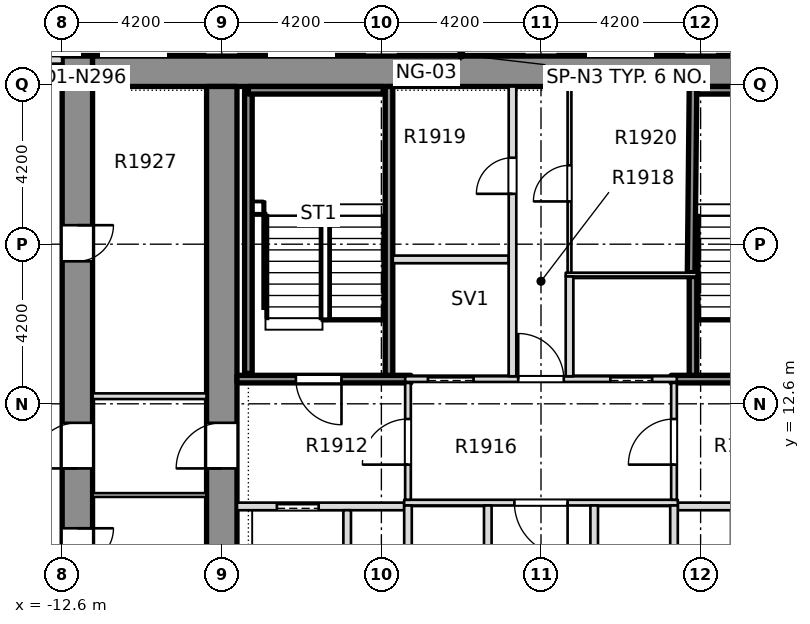
"""IFC4 building model, lengths in metres.
Left out: names, types, materials, properties, quantities, classifications, styles, units other than length and angle.
Written with IfcOpenShell. Run it as: python <this file> out.ifc"""

import sys

from ifc_helpers import new_model, si_unit, direction, frame, frame_2d, origin, place, context, subcontext, project, spatial, rectangle, extrude, element, fill, save


model = new_model("IFC4")
c1 = context("Model", 3, precision=1e-05, world=origin(), true_north=direction((0.0, 1.0)))
c2 = subcontext(c1, "Body", "Model", "MODEL_VIEW")
j1 = project(units=[si_unit("LENGTHUNIT", "METRE"), si_unit("PLANEANGLEUNIT", "RADIAN")], contexts=[c1])
p1 = place(None, origin())
s1 = spatial("IfcSite", under=j1, at=p1, CompositionType="ELEMENT")
p2 = place(p1, origin())
s2 = spatial("IfcBuilding", under=s1, at=p2, CompositionType="ELEMENT")
p3 = place(p2, frame((0.0, 0.0, 75.9)))
s3 = spatial("IfcBuildingStorey", under=s2, at=p3, CompositionType="ELEMENT", Elevation=75.9)
p4 = place(p3, frame((-12.15, -8.4, -0.5), z_axis=(0.0, 0.0, 1.0), x_axis=(0.0, 1.0, 0.0)))
e1 = element("IfcWall", 1, at=p4, inside=s3, PredefinedType="SHEAR", context=c2, shape_type="SweptSolid", body=[
    extrude(rectangle(XDim=30.15, YDim=0.9, at=frame_2d((15.075, 0.0))), origin(), (0.0, 0.0, 1.0), 4.68),
])
p5 = place(p4, frame((3.925, 0.0, 0.5)))
e2 = element("IfcOpeningElement", 2, at=p5, cuts=e1, PredefinedType="OPENING", context=c2, shape_type="SweptSolid", body=[
    extrude(rectangle(XDim=0.95, YDim=2.1, at=frame_2d((0.475, 1.05))), frame((0.0, 0.46, 0.0), z_axis=(0.0, -1.0, 0.0), x_axis=(1.0, 0.0, 0.0)), (0.0, 0.0, 1.0), 0.92),
])
p6 = place(p4, frame((9.175, 0.0, 0.5)))
e3 = element("IfcOpeningElement", 3, at=p6, cuts=e1, PredefinedType="OPENING", context=c2, shape_type="SweptSolid", body=[
    extrude(rectangle(XDim=0.95, YDim=2.1, at=frame_2d((0.475, 1.05))), frame((0.0, 0.46, 0.0), z_axis=(0.0, -1.0, 0.0), x_axis=(1.0, 0.0, 0.0)), (0.0, 0.0, 1.0), 0.92),
])
p7 = place(p4, frame((14.525, 0.0, 0.5)))
e4 = element("IfcOpeningElement", 4, at=p7, cuts=e1, PredefinedType="OPENING", context=c2, shape_type="SweptSolid", body=[
    extrude(rectangle(XDim=0.95, YDim=2.1, at=frame_2d((0.475, 1.05))), frame((0.0, 0.46, 0.0), z_axis=(0.0, -1.0, 0.0), x_axis=(1.0, 0.0, 0.0)), (0.0, 0.0, 1.0), 0.92),
])
p8 = place(p4, frame((22.225, 0.0, 0.5)))
e5 = element("IfcOpeningElement", 5, at=p8, cuts=e1, PredefinedType="OPENING", context=c2, shape_type="SweptSolid", body=[
    extrude(rectangle(XDim=0.95, YDim=2.1, at=frame_2d((0.475, 1.05))), frame((0.0, 0.46, 0.0), z_axis=(0.0, -1.0, 0.0), x_axis=(1.0, 0.0, 0.0)), (0.0, 0.0, 1.0), 0.92),
])
p9 = place(p4, frame((26.25, 0.0, 0.5)))
e6 = element("IfcOpeningElement", 6, at=p9, cuts=e1, PredefinedType="OPENING", context=c2, shape_type="SweptSolid", body=[
    extrude(rectangle(XDim=0.95, YDim=2.1, at=frame_2d((0.475, 1.05))), frame((0.0, 0.46, 0.0), z_axis=(0.0, -1.0, 0.0), x_axis=(1.0, 0.0, 0.0)), (0.0, 0.0, 1.0), 0.92),
])
p10 = place(p4, frame((19.3, 0.0, 0.5)))
e7 = element("IfcOpeningElement", 7, at=p10, cuts=e1, PredefinedType="OPENING", context=c2, shape_type="SweptSolid", body=[
    extrude(rectangle(XDim=1.2, YDim=2.1, at=frame_2d((0.6, 1.05))), frame((0.0, 0.46, 0.0), z_axis=(0.0, -1.0, 0.0), x_axis=(1.0, 0.0, 0.0)), (0.0, 0.0, 1.0), 0.92),
])
p11 = place(p3, frame((-11.7, 21.3, -0.5), z_axis=(0.0, 0.0, 1.0), x_axis=(1.0, 0.0, 0.0)))
e8 = element("IfcWall", 8, at=p11, inside=s3, PredefinedType="SOLIDWALL", context=c2, shape_type="SweptSolid", body=[
    extrude(rectangle(XDim=23.4, YDim=0.9, at=frame_2d((11.7, 0.0))), origin(), (0.0, 0.0, 1.0), 4.68),
])
p12 = place(p3, frame((-8.4, -7.5, -0.5), z_axis=(0.0, 0.0, 1.0), x_axis=(0.0, 1.0, 0.0)))
e9 = element("IfcWall", 9, at=p12, inside=s3, PredefinedType="SHEAR", context=c2, shape_type="SweptSolid", body=[
    extrude(rectangle(XDim=28.35, YDim=0.9, at=frame_2d((14.175, 0.0))), origin(), (0.0, 0.0, 1.0), 4.68),
])
p13 = place(p12, frame((18.4, 0.0, 0.5)))
e10 = element("IfcOpeningElement", 10, at=p13, cuts=e9, PredefinedType="OPENING", context=c2, shape_type="SweptSolid", body=[
    extrude(rectangle(XDim=1.2, YDim=2.1, at=frame_2d((0.6, 1.05))), frame((0.0, 0.46, 0.0), z_axis=(0.0, -1.0, 0.0), x_axis=(1.0, 0.0, 0.0)), (0.0, 0.0, 1.0), 0.92),
])
p14 = place(p3, frame((-12.6, 21.65, 0.0), z_axis=(0.0, 0.0, 1.0), x_axis=(-1.0, 0.0, 0.0)))
e11 = element("IfcWall", 11, at=p14, inside=s3, PredefinedType="STANDARD", context=c2, shape_type="SweptSolid", body=[
    extrude(rectangle(XDim=3.5, YDim=0.2, at=frame_2d((1.75, 0.0))), origin(), (0.0, 0.0, 1.0), 4.18),
])
p15 = place(p3, frame((-7.949, 9.9, 0.0), z_axis=(0.0, 0.0, 1.0), x_axis=(1.0, 0.0, 0.0)))
e12 = element("IfcWall", 12, at=p15, inside=s3, PredefinedType="PARTITIONING", context=c2, shape_type="SweptSolid", body=[
    extrude(rectangle(XDim=4.349, YDim=0.2, at=frame_2d((2.174, 0.0))), origin(), (0.0, 0.0, 1.0), 4.18),
])
p16 = place(p15, frame((0.999, 0.0, 0.0)))
e13 = element("IfcOpeningElement", 13, at=p16, cuts=e12, PredefinedType="OPENING", context=c2, shape_type="SweptSolid", body=[
    extrude(rectangle(XDim=1.1, YDim=2.1, at=frame_2d((0.55, 1.05))), frame((0.0, 0.11, 0.0), z_axis=(0.0, -1.0, 0.0), x_axis=(1.0, 0.0, 0.0)), (0.0, 0.0, 1.0), 0.22),
])
p17 = place(p3, frame((3.6, 9.9, 0.0), z_axis=(0.0, 0.0, 1.0), x_axis=(1.0, 0.0, 0.0)))
e14 = element("IfcWall", 14, at=p17, inside=s3, PredefinedType="PARTITIONING", context=c2, shape_type="SweptSolid", body=[
    extrude(rectangle(XDim=4.349, YDim=0.2, at=frame_2d((2.174, 0.0))), origin(), (0.0, 0.0, 1.0), 4.18),
])
p18 = place(p17, frame((2.25, 0.0, 0.0)))
e15 = element("IfcOpeningElement", 15, at=p18, cuts=e14, PredefinedType="OPENING", context=c2, shape_type="SweptSolid", body=[
    extrude(rectangle(XDim=1.1, YDim=2.1, at=frame_2d((0.55, 1.05))), frame((0.0, 0.11, 0.0), z_axis=(0.0, -1.0, 0.0), x_axis=(1.0, 0.0, 0.0)), (0.0, 0.0, 1.0), 0.22),
])
p19 = place(p3, frame((-3.6, 10.0, 0.0), z_axis=(0.0, 0.0, 1.0), x_axis=(1.0, 0.0, 0.0)))
e16 = element("IfcWall", 16, at=p19, inside=s3, PredefinedType="PARTITIONING", context=c2, shape_type="SweptSolid", body=[
    extrude(rectangle(XDim=7.2, YDim=0.15, at=frame_2d((3.6, 0.0))), origin(), (0.0, 0.0, 1.0), 4.18),
])
p20 = place(p19, frame((2.9, 0.0, 0.0)))
e17 = element("IfcOpeningElement", 17, at=p20, cuts=e16, PredefinedType="OPENING", context=c2, shape_type="SweptSolid", body=[
    extrude(rectangle(XDim=1.4, YDim=2.1, at=frame_2d((0.7, 1.05))), frame((0.0, 0.085, 0.0), z_axis=(0.0, -1.0, 0.0), x_axis=(1.0, 0.0, 0.0)), (0.0, 0.0, 1.0), 0.17),
])
p21 = place(p3, frame((-7.949, 13.25, 0.0), z_axis=(0.0, 0.0, 1.0), x_axis=(1.0, 0.0, 0.0)))
e18 = element("IfcWall", 18, at=p21, inside=s3, PredefinedType="SOLIDWALL", context=c2, shape_type="SweptSolid", body=[
    extrude(rectangle(XDim=4.524, YDim=0.2, at=frame_2d((2.262, 0.0))), origin(), (0.0, 0.0, 1.0), 4.18),
])
p22 = place(p21, frame((1.499, 0.0, 0.0)))
e19 = element("IfcOpeningElement", 19, at=p22, cuts=e18, PredefinedType="OPENING", context=c2, shape_type="SweptSolid", body=[
    extrude(rectangle(XDim=1.2, YDim=2.1, at=frame_2d((0.6, 1.05))), frame((0.0, 0.11, 0.0), z_axis=(0.0, -1.0, 0.0), x_axis=(1.0, 0.0, 0.0)), (0.0, 0.0, 1.0), 0.22),
])
p23 = place(p3, frame((-3.575, 13.25, 0.0), z_axis=(0.0, 0.0, 1.0), x_axis=(1.0, 0.0, 0.0)))
e20 = element("IfcWall", 20, at=p23, inside=s3, PredefinedType="PARTITIONING", context=c2, shape_type="SweptSolid", body=[
    extrude(rectangle(XDim=7.15, YDim=0.15, at=frame_2d((3.575, 0.0))), origin(), (0.0, 0.0, 1.0), 4.18),
])
p24 = place(p23, frame((0.6, 0.0, 0.0)))
e21 = element("IfcOpeningElement", 21, at=p24, cuts=e20, PredefinedType="OPENING", context=c2, shape_type="SweptSolid", body=[
    extrude(rectangle(XDim=1.2, YDim=2.1, at=frame_2d((0.6, 1.05))), frame((0.0, 0.085, 0.0), z_axis=(0.0, -1.0, 0.0), x_axis=(1.0, 0.0, 0.0)), (0.0, 0.0, 1.0), 0.17),
])
p25 = place(p23, frame((5.4, 0.0, 0.0)))
e22 = element("IfcOpeningElement", 22, at=p25, cuts=e20, PredefinedType="OPENING", context=c2, shape_type="SweptSolid", body=[
    extrude(rectangle(XDim=1.1, YDim=2.1, at=frame_2d((0.55, 1.05))), frame((0.0, 0.085, 0.0), z_axis=(0.0, -1.0, 0.0), x_axis=(1.0, 0.0, 0.0)), (0.0, 0.0, 1.0), 0.17),
])
p26 = place(p23, frame((2.975, 0.0, 0.0)))
e23 = element("IfcOpeningElement", 23, at=p26, cuts=e20, PredefinedType="OPENING", context=c2, shape_type="SweptSolid", body=[
    extrude(rectangle(XDim=1.2, YDim=2.1, at=frame_2d((0.6, 1.05))), frame((0.0, 0.085, 0.0), z_axis=(0.0, -1.0, 0.0), x_axis=(1.0, 0.0, 0.0)), (0.0, 0.0, 1.0), 0.17),
])
p27 = place(p3, frame((3.425, 13.25, 0.0), z_axis=(0.0, 0.0, 1.0), x_axis=(1.0, 0.0, 0.0)))
e24 = element("IfcWall", 24, at=p27, inside=s3, PredefinedType="SOLIDWALL", context=c2, shape_type="SweptSolid", body=[
    extrude(rectangle(XDim=4.524, YDim=0.2, at=frame_2d((2.262, 0.0))), origin(), (0.0, 0.0, 1.0), 4.18),
])
p28 = place(p27, frame((1.825, 0.0, 0.0)))
e25 = element("IfcOpeningElement", 25, at=p28, cuts=e24, PredefinedType="OPENING", context=c2, shape_type="SweptSolid", body=[
    extrude(rectangle(XDim=1.2, YDim=2.1, at=frame_2d((0.6, 1.05))), frame((0.0, 0.11, 0.0), z_axis=(0.0, -1.0, 0.0), x_axis=(1.0, 0.0, 0.0)), (0.0, 0.0, 1.0), 0.22),
])
p29 = place(p3, frame((0.65, 16.0, 0.0), z_axis=(0.0, 0.0, 1.0), x_axis=(1.0, 0.0, 0.0)))
e26 = element("IfcWall", 26, at=p29, inside=s3, PredefinedType="PARTITIONING", context=c2, shape_type="SweptSolid", body=[
    extrude(rectangle(XDim=3.45, YDim=0.1, at=frame_2d((1.725, 0.0))), origin(), (0.0, 0.0, 1.0), 4.18),
])
p30 = place(p3, frame((-3.9, 16.4, 0.0), z_axis=(0.0, 0.0, 1.0), x_axis=(1.0, 0.0, 0.0)))
e27 = element("IfcWall", 27, at=p30, inside=s3, PredefinedType="PARTITIONING", context=c2, shape_type="SweptSolid", body=[
    extrude(rectangle(XDim=3.05, YDim=0.2, at=frame_2d((1.525, 0.0))), origin(), (0.0, 0.0, 1.0), 4.18),
])
p31 = place(p3, frame((-5.1, 7.075, 0.0), z_axis=(0.0, 0.0, 1.0), x_axis=(0.0, 1.0, 0.0)))
e28 = element("IfcWall", 28, at=p31, inside=s3, PredefinedType="PARTITIONING", context=c2, shape_type="SweptSolid", body=[
    extrude(rectangle(XDim=2.725, YDim=0.2, at=frame_2d((1.363, 0.0))), origin(), (0.0, 0.0, 1.0), 4.18),
])
p32 = place(p3, frame((-4.0, 13.35, 0.0), z_axis=(0.0, 0.0, 1.0), x_axis=(0.0, 1.0, 0.0)))
e29 = element("IfcWall", 29, at=p32, inside=s3, PredefinedType="SOLIDWALL", context=c2, shape_type="SweptSolid", body=[
    extrude(rectangle(XDim=7.499, YDim=0.2, at=frame_2d((3.75, 0.0))), origin(), (0.0, 0.0, 1.0), 4.18),
])
p33 = place(p3, frame((-3.5, 7.075, 0.0), z_axis=(0.0, 0.0, 1.0), x_axis=(0.0, 1.0, 0.0)))
e30 = element("IfcWall", 30, at=p33, inside=s3, PredefinedType="PARTITIONING", context=c2, shape_type="SweptSolid", body=[
    extrude(rectangle(XDim=2.85, YDim=0.2, at=frame_2d((1.425, 0.0))), origin(), (0.0, 0.0, 1.0), 4.18),
])
p34 = place(p3, frame((-3.5, 10.075, 0.0), z_axis=(0.0, 0.0, 1.0), x_axis=(0.0, 1.0, 0.0)))
e31 = element("IfcWall", 31, at=p34, inside=s3, PredefinedType="PARTITIONING", context=c2, shape_type="SweptSolid", body=[
    extrude(rectangle(XDim=3.075, YDim=0.15, at=frame_2d((1.538, 0.0))), origin(), (0.0, 0.0, 1.0), 4.18),
])
p35 = place(p34, frame((0.925, 0.0, 0.0)))
e32 = element("IfcOpeningElement", 32, at=p35, cuts=e31, PredefinedType="OPENING", context=c2, shape_type="SweptSolid", body=[
    extrude(rectangle(XDim=1.2, YDim=2.1, at=frame_2d((0.6, 1.05))), frame((0.0, 0.085, 0.0), z_axis=(0.0, -1.0, 0.0), x_axis=(1.0, 0.0, 0.0)), (0.0, 0.0, 1.0), 0.17),
])
p36 = place(p3, frame((-1.4, 7.075, 0.0), z_axis=(0.0, 0.0, 1.0), x_axis=(0.0, 1.0, 0.0)))
e33 = element("IfcWall", 33, at=p36, inside=s3, PredefinedType="PARTITIONING", context=c2, shape_type="SweptSolid", body=[
    extrude(rectangle(XDim=2.85, YDim=0.2, at=frame_2d((1.425, 0.0))), origin(), (0.0, 0.0, 1.0), 4.18),
])
p37 = place(p3, frame((-0.75, 13.325, 0.0), z_axis=(0.0, 0.0, 1.0), x_axis=(0.0, 1.0, 0.0)))
e34 = element("IfcWall", 34, at=p37, inside=s3, PredefinedType="PARTITIONING", context=c2, shape_type="SweptSolid", body=[
    extrude(rectangle(XDim=7.524, YDim=0.2, at=frame_2d((3.762, 0.0))), origin(), (0.0, 0.0, 1.0), 4.18),
])
p38 = place(p37, frame((4.8, 0.0, 0.0)))
e35 = element("IfcOpeningElement", 35, at=p38, cuts=e34, PredefinedType="OPENING", context=c2, shape_type="SweptSolid", body=[
    extrude(rectangle(XDim=0.95, YDim=2.1, at=frame_2d((0.475, 1.05))), frame((0.0, 0.11, 0.0), z_axis=(0.0, -1.0, 0.0), x_axis=(1.0, 0.0, 0.0)), (0.0, 0.0, 1.0), 0.22),
])
p39 = place(p3, frame((0.75, 13.325, 0.0), z_axis=(0.0, 0.0, 1.0), x_axis=(0.0, 1.0, 0.0)))
e36 = element("IfcWall", 36, at=p39, inside=s3, PredefinedType="PARTITIONING", context=c2, shape_type="SweptSolid", body=[
    extrude(rectangle(XDim=2.625, YDim=0.2, at=frame_2d((1.312, 0.0))), origin(), (0.0, 0.0, 1.0), 4.18),
])
p40 = place(p3, frame((0.75, 16.05, 0.0), z_axis=(0.0, 0.0, 1.0), x_axis=(0.0, 1.0, 0.0)))
e37 = element("IfcWall", 37, at=p40, inside=s3, PredefinedType="PARTITIONING", context=c2, shape_type="SweptSolid", body=[
    extrude(rectangle(XDim=4.799, YDim=0.1, at=frame_2d((2.399, 0.0))), origin(), (0.0, 0.0, 1.0), 4.18),
])
p41 = place(p40, frame((1.875, 0.0, 0.0)))
e38 = element("IfcOpeningElement", 38, at=p41, cuts=e37, PredefinedType="OPENING", context=c2, shape_type="SweptSolid", body=[
    extrude(rectangle(XDim=0.95, YDim=2.1, at=frame_2d((0.475, 1.05))), frame((0.0, 0.06, 0.0), z_axis=(0.0, -1.0, 0.0), x_axis=(1.0, 0.0, 0.0)), (0.0, 0.0, 1.0), 0.12),
])
for number, where, z_axis, x_axis in (
    (39, (1.4, 7.075, 0.0), (0.0, 0.0, 1.0), (0.0, 1.0, 0.0)),
    (40, (3.5, 7.075, 0.0), (0.0, 0.0, 1.0), (0.0, 1.0, 0.0)),
):
    element("IfcWall", number, at=place(p3, frame(where, z_axis=z_axis, x_axis=x_axis)), inside=s3, PredefinedType="PARTITIONING", context=c2, shape_type="SweptSolid", body=[
        extrude(rectangle(XDim=2.85, YDim=0.2, at=frame_2d((1.425, 0.0))), origin(), (0.0, 0.0, 1.0), 4.18),
    ])
p42 = place(p3, frame((3.5, 10.075, 0.0), z_axis=(0.0, 0.0, 1.0), x_axis=(0.0, 1.0, 0.0)))
e41 = element("IfcWall", 41, at=p42, inside=s3, PredefinedType="PARTITIONING", context=c2, shape_type="SweptSolid", body=[
    extrude(rectangle(XDim=3.075, YDim=0.15, at=frame_2d((1.538, 0.0))), origin(), (0.0, 0.0, 1.0), 4.18),
])
p43 = place(p42, frame((0.925, 0.0, 0.0)))
e42 = element("IfcOpeningElement", 42, at=p43, cuts=e41, PredefinedType="OPENING", context=c2, shape_type="SweptSolid", body=[
    extrude(rectangle(XDim=1.2, YDim=2.1, at=frame_2d((0.6, 1.05))), frame((0.0, 0.085, 0.0), z_axis=(0.0, -1.0, 0.0), x_axis=(1.0, 0.0, 0.0)), (0.0, 0.0, 1.0), 0.17),
])
p44 = place(p3, frame((4.0, 13.35, 0.0), z_axis=(0.0, 0.0, 1.0), x_axis=(0.0, 1.0, 0.0)))
e43 = element("IfcWall", 43, at=p44, inside=s3, PredefinedType="SOLIDWALL", context=c2, shape_type="SweptSolid", body=[
    extrude(rectangle(XDim=2.6, YDim=0.2, at=frame_2d((1.3, 0.0))), origin(), (0.0, 0.0, 1.0), 4.18),
])
p45 = place(p3, frame((3.95, 16.05, 0.0), z_axis=(0.0, 0.0, 1.0), x_axis=(0.010538176883, 0.999944471872, 0.0)))
e44 = element("IfcWall", 44, at=p45, inside=s3, PredefinedType="SOLIDWALL", context=c2, shape_type="SweptSolid", body=[
    extrude(rectangle(XDim=4.749, YDim=0.2, at=frame_2d((2.375, 0.0))), origin(), (0.0, 0.0, 1.0), 4.18),
])
p46 = place(p3, frame((-11.699, 10.2, 0.0), z_axis=(0.0, 0.0, 1.0), x_axis=(1.0, 0.0, 0.0)))
e45 = element("IfcWall", 45, at=p46, inside=s3, PredefinedType="PARTITIONING", context=c2, shape_type="SweptSolid", body=[
    extrude(rectangle(XDim=2.848, YDim=0.15, at=frame_2d((1.424, 0.0))), origin(), (0.0, 0.0, 1.0), 4.18),
])
for number, where, z_axis, x_axis in (
    (46, (-11.699, 12.8, 0.0), (0.0, 0.0, 1.0), (1.0, 0.0, 0.0)),
    (47, (-11.699, 15.8, 0.0), (0.0, 0.0, 1.0), (1.0, 0.0, 0.0)),
):
    element("IfcWall", number, at=place(p3, frame(where, z_axis=z_axis, x_axis=x_axis)), inside=s3, PredefinedType="PARTITIONING", context=c2, shape_type="SweptSolid", body=[
        extrude(rectangle(XDim=2.848, YDim=0.1, at=frame_2d((1.424, 0.0))), origin(), (0.0, 0.0, 1.0), 4.18),
    ])
p47 = place(p3, frame((-7.7, 13.4, 0.0), z_axis=(0.0, 0.0, 1.0), x_axis=(0.0, 1.0, 0.0)))
e48 = element("IfcWall", 48, at=p47, inside=s3, PredefinedType="SOLIDWALL", context=c2, shape_type="SweptSolid", body=[
    extrude(rectangle(XDim=7.4, YDim=0.2, at=frame_2d((3.7, 0.0))), origin(), (0.0, 0.0, 1.0), 4.18),
])
p48 = place(p22, origin())
e49 = element("IfcDoor", 49, at=p48, inside=s3, OperationType="SINGLE_SWING_LEFT", PredefinedType="DOOR", context=c2, shape_type="SweptSolid", body=[
    extrude(rectangle(XDim=1.2, YDim=2.1, at=frame_2d((0.6, 1.05))), frame((0.0, 0.025, 0.0), z_axis=(0.0, -1.0, 0.0), x_axis=(1.0, 0.0, 0.0)), (0.0, 0.0, 1.0), 0.05),
])
fill(e19, e49)
p49 = place(p16, origin())
e50 = element("IfcDoor", 50, at=p49, inside=s3, OperationType="SLIDING_TO_RIGHT", PredefinedType="DOOR", context=c2, shape_type="SweptSolid", body=[
    extrude(rectangle(XDim=1.1, YDim=2.1, at=frame_2d((0.55, 1.05))), frame((0.0, 0.025, 0.0), z_axis=(0.0, -1.0, 0.0), x_axis=(1.0, 0.0, 0.0)), (0.0, 0.0, 1.0), 0.05),
])
fill(e13, e50)
p50 = place(p20, origin())
e51 = element("IfcDoor", 51, at=p50, inside=s3, OperationType="SINGLE_SWING_RIGHT", PredefinedType="DOOR", context=c2, shape_type="SweptSolid", body=[
    extrude(rectangle(XDim=1.4, YDim=2.1, at=frame_2d((0.7, 1.05))), frame((0.0, 0.025, 0.0), z_axis=(0.0, -1.0, 0.0), x_axis=(1.0, 0.0, 0.0)), (0.0, 0.0, 1.0), 0.05),
])
fill(e17, e51)
p51 = place(p24, origin())
e52 = element("IfcDoor", 52, at=p51, inside=s3, OperationType="SLIDING_TO_RIGHT", PredefinedType="DOOR", context=c2, shape_type="SweptSolid", body=[
    extrude(rectangle(XDim=1.2, YDim=2.1, at=frame_2d((0.6, 1.05))), frame((0.0, 0.025, 0.0), z_axis=(0.0, -1.0, 0.0), x_axis=(1.0, 0.0, 0.0)), (0.0, 0.0, 1.0), 0.05),
])
fill(e21, e52)
p52 = place(p25, origin())
e53 = element("IfcDoor", 53, at=p52, inside=s3, OperationType="SLIDING_TO_LEFT", PredefinedType="DOOR", context=c2, shape_type="SweptSolid", body=[
    extrude(rectangle(XDim=1.1, YDim=2.1, at=frame_2d((0.55, 1.05))), frame((0.0, 0.025, 0.0), z_axis=(0.0, -1.0, 0.0), x_axis=(1.0, 0.0, 0.0)), (0.0, 0.0, 1.0), 0.05),
])
fill(e22, e53)
p53 = place(p26, origin())
e54 = element("IfcDoor", 54, at=p53, inside=s3, OperationType="SINGLE_SWING_RIGHT", PredefinedType="DOOR", context=c2, shape_type="SweptSolid", body=[
    extrude(rectangle(XDim=1.2, YDim=2.1, at=frame_2d((0.6, 1.05))), frame((0.0, 0.025, 0.0), z_axis=(0.0, -1.0, 0.0), x_axis=(1.0, 0.0, 0.0)), (0.0, 0.0, 1.0), 0.05),
])
fill(e23, e54)
p54 = place(p38, origin())
e55 = element("IfcDoor", 55, at=p54, inside=s3, OperationType="SINGLE_SWING_RIGHT", PredefinedType="DOOR", context=c2, shape_type="SweptSolid", body=[
    extrude(rectangle(XDim=0.95, YDim=2.1, at=frame_2d((0.475, 1.05))), frame((0.0, 0.025, 0.0), z_axis=(0.0, -1.0, 0.0), x_axis=(1.0, 0.0, 0.0)), (0.0, 0.0, 1.0), 0.05),
])
fill(e35, e55)
p55 = place(p41, origin())
e56 = element("IfcDoor", 56, at=p55, inside=s3, OperationType="SINGLE_SWING_LEFT", PredefinedType="DOOR", context=c2, shape_type="SweptSolid", body=[
    extrude(rectangle(XDim=0.95, YDim=2.1, at=frame_2d((0.475, 1.05))), frame((0.0, 0.025, 0.0), z_axis=(0.0, -1.0, 0.0), x_axis=(1.0, 0.0, 0.0)), (0.0, 0.0, 1.0), 0.05),
])
fill(e38, e56)
p56 = place(p35, origin())
e57 = element("IfcDoor", 57, at=p56, inside=s3, OperationType="SINGLE_SWING_RIGHT", PredefinedType="DOOR", context=c2, shape_type="SweptSolid", body=[
    extrude(rectangle(XDim=1.2, YDim=2.1, at=frame_2d((0.6, 1.05))), frame((0.0, 0.025, 0.0), z_axis=(0.0, -1.0, 0.0), x_axis=(1.0, 0.0, 0.0)), (0.0, 0.0, 1.0), 0.05),
])
fill(e32, e57)
p57 = place(p43, origin())
e58 = element("IfcDoor", 58, at=p57, inside=s3, OperationType="SINGLE_SWING_LEFT", PredefinedType="DOOR", context=c2, shape_type="SweptSolid", body=[
    extrude(rectangle(XDim=1.2, YDim=2.1, at=frame_2d((0.6, 1.05))), frame((0.0, 0.025, 0.0), z_axis=(0.0, -1.0, 0.0), x_axis=(1.0, 0.0, 0.0)), (0.0, 0.0, 1.0), 0.05),
])
fill(e42, e58)
p58 = place(p8, origin())
e59 = element("IfcDoor", 59, at=p58, inside=s3, OperationType="SINGLE_SWING_LEFT", PredefinedType="DOOR", context=c2, shape_type="SweptSolid", body=[
    extrude(rectangle(XDim=0.95, YDim=2.1, at=frame_2d((0.475, 1.05))), frame((0.0, 0.025, 0.0), z_axis=(0.0, -1.0, 0.0), x_axis=(1.0, 0.0, 0.0)), (0.0, 0.0, 1.0), 0.05),
])
fill(e5, e59)
p59 = place(p9, origin())
e60 = element("IfcDoor", 60, at=p59, inside=s3, OperationType="SINGLE_SWING_LEFT", PredefinedType="DOOR", context=c2, shape_type="SweptSolid", body=[
    extrude(rectangle(XDim=0.95, YDim=2.1, at=frame_2d((0.475, 1.05))), frame((0.0, 0.025, 0.0), z_axis=(0.0, -1.0, 0.0), x_axis=(1.0, 0.0, 0.0)), (0.0, 0.0, 1.0), 0.05),
])
fill(e6, e60)
p60 = place(p10, origin())
e61 = element("IfcDoor", 61, at=p60, inside=s3, OperationType="SINGLE_SWING_LEFT", PredefinedType="DOOR", context=c2, shape_type="SweptSolid", body=[
    extrude(rectangle(XDim=1.2, YDim=2.1, at=frame_2d((0.6, 1.05))), frame((0.0, 0.025, 0.0), z_axis=(0.0, -1.0, 0.0), x_axis=(1.0, 0.0, 0.0)), (0.0, 0.0, 1.0), 0.05),
])
fill(e7, e61)
p61 = place(p13, origin())
e62 = element("IfcDoor", 62, at=p61, inside=s3, OperationType="SINGLE_SWING_LEFT", PredefinedType="DOOR", context=c2, shape_type="SweptSolid", body=[
    extrude(rectangle(XDim=1.2, YDim=2.1, at=frame_2d((0.6, 1.05))), frame((0.0, 0.025, 0.0), z_axis=(0.0, -1.0, 0.0), x_axis=(1.0, 0.0, 0.0)), (0.0, 0.0, 1.0), 0.05),
])
fill(e10, e62)
save(model, sys.argv[1])
